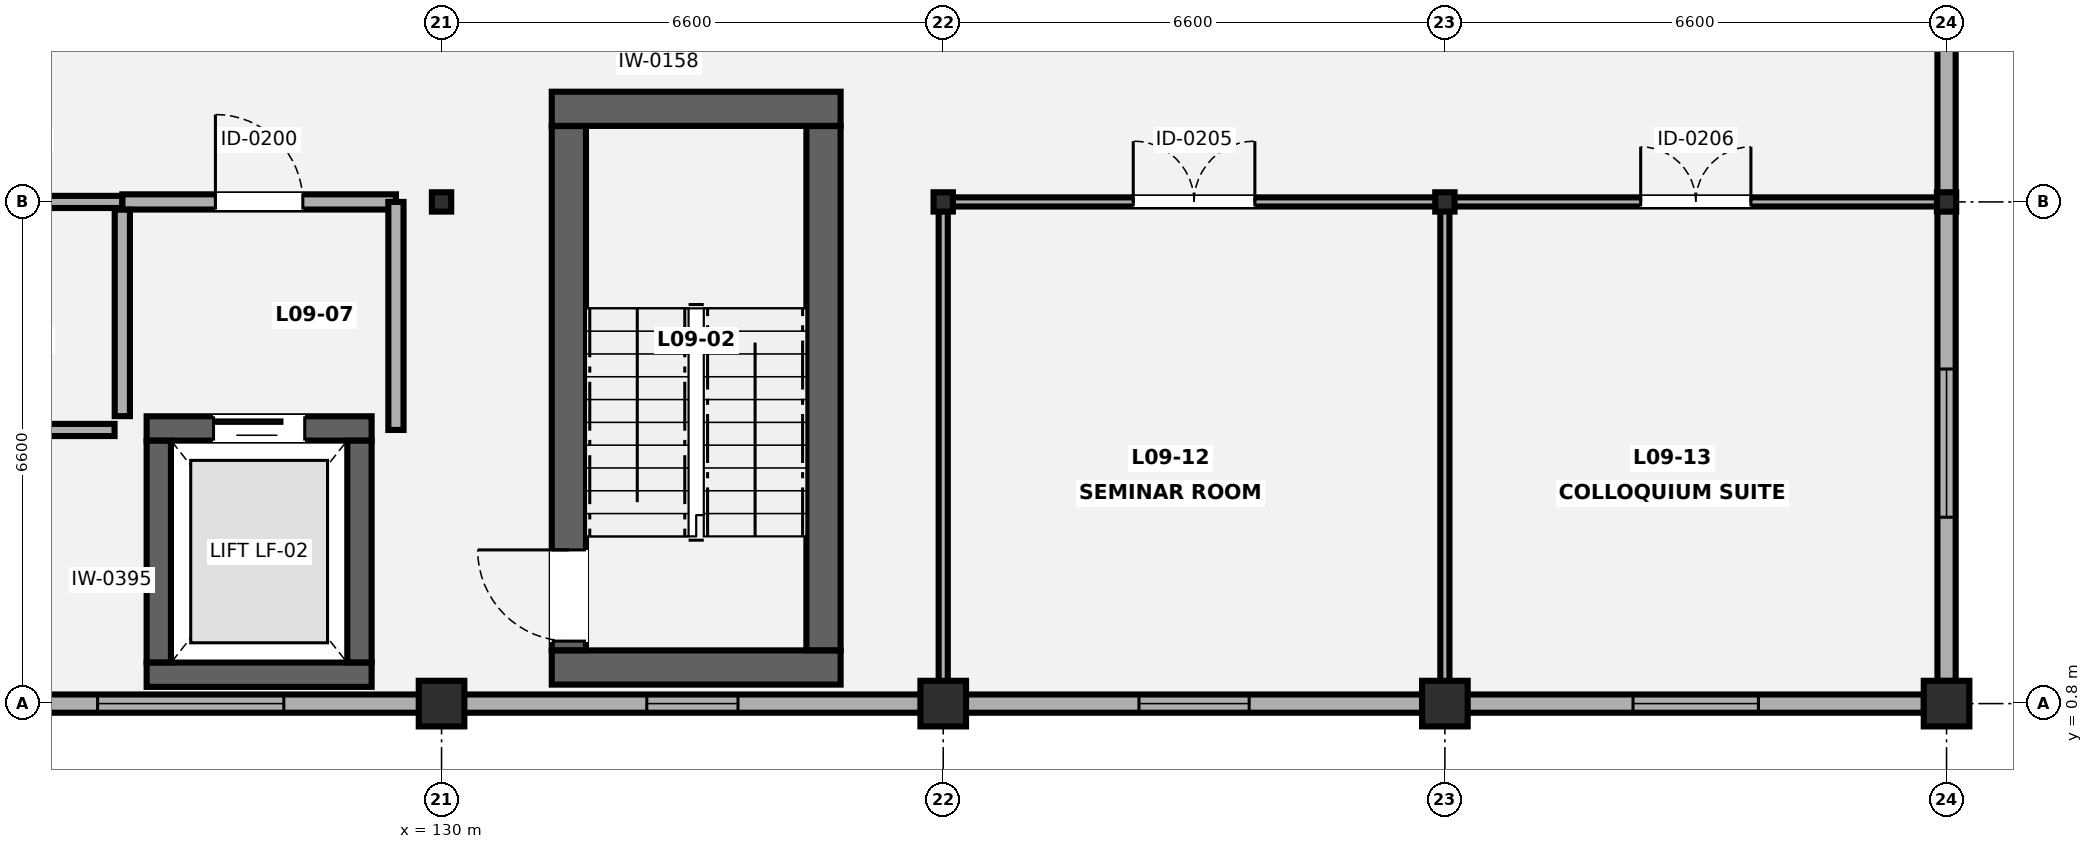
"""IFC4 building model, lengths in metres.
Left out: names, types, materials, properties, quantities, classifications, styles, units other than length and angle.
Written with IfcOpenShell. Run it as: python <this file> out.ifc"""

import sys

from ifc_helpers import new_model, si_unit, direction, frame, frame_2d, origin, origin_2d, place, context, subcontext, project, spatial, rectangle, circle, i_section, extrude, element, fill, save


model = new_model("IFC4")
c1 = context("Model", 3, precision=1e-05, world=origin(), true_north=direction((0.0, 1.0)))
c2 = subcontext(c1, "Body", "Model", "MODEL_VIEW")
j1 = project(units=[si_unit("LENGTHUNIT", "METRE"), si_unit("PLANEANGLEUNIT", "RADIAN")], contexts=[c1])
p1 = place(None, origin())
s1 = spatial("IfcSite", under=j1, at=p1, CompositionType="ELEMENT")
p2 = place(p1, origin())
s2 = spatial("IfcBuilding", under=s1, at=p2, CompositionType="ELEMENT")
p3 = place(p2, frame((0.0, 0.0, 38.15)))
s3 = spatial("IfcBuildingStorey", under=s2, at=p3, CompositionType="ELEMENT", Elevation=38.15)
p4 = place(p3, frame((130.0, 0.8, 0.0), z_axis=(0.0, 0.0, 1.0), x_axis=(1.0, 0.0, 0.0)))
e1 = element("IfcColumn", 1, at=p4, inside=s3, PredefinedType="PILASTER", context=c2, shape_type="SweptSolid", body=[
    extrude(circle(Radius=0.3, at=origin_2d()), origin(), (0.0, 0.0, 1.0), 3.85),
])
p5 = place(p3, frame((130.0, 7.4, 0.0), z_axis=(0.0, 0.0, 1.0), x_axis=(1.0, 0.0, 0.0)))
e2 = element("IfcColumn", 2, at=p5, inside=s3, PredefinedType="COLUMN", context=c2, shape_type="SweptSolid", body=[
    extrude(i_section(OverallWidth=0.254, OverallDepth=0.254, WebThickness=0.009, FlangeThickness=0.014, FilletRadius=0.014, at=origin_2d()), origin(), (0.0, 0.0, 1.0), 3.85),
])
p6 = place(p3, frame((136.6, 0.8, 0.0), z_axis=(0.0, 0.0, 1.0), x_axis=(1.0, 0.0, 0.0)))
e3 = element("IfcColumn", 3, at=p6, inside=s3, PredefinedType="PILASTER", context=c2, shape_type="SweptSolid", body=[
    extrude(circle(Radius=0.3, at=origin_2d()), origin(), (0.0, 0.0, 1.0), 3.85),
])
p7 = place(p3, frame((136.6, 7.4, 0.0), z_axis=(0.0, 0.0, 1.0), x_axis=(1.0, 0.0, 0.0)))
e4 = element("IfcColumn", 4, at=p7, inside=s3, PredefinedType="COLUMN", context=c2, shape_type="SweptSolid", body=[
    extrude(i_section(OverallWidth=0.254, OverallDepth=0.254, WebThickness=0.009, FlangeThickness=0.014, FilletRadius=0.014, at=origin_2d()), origin(), (0.0, 0.0, 1.0), 3.85),
])
p8 = place(p3, frame((143.2, 0.8, 0.0), z_axis=(0.0, 0.0, 1.0), x_axis=(1.0, 0.0, 0.0)))
e5 = element("IfcColumn", 5, at=p8, inside=s3, PredefinedType="PILASTER", context=c2, shape_type="SweptSolid", body=[
    extrude(circle(Radius=0.3, at=origin_2d()), origin(), (0.0, 0.0, 1.0), 3.57),
])
p9 = place(p3, frame((143.2, 7.4, 0.0), z_axis=(0.0, 0.0, 1.0), x_axis=(1.0, 0.0, 0.0)))
e6 = element("IfcColumn", 6, at=p9, inside=s3, PredefinedType="COLUMN", context=c2, shape_type="SweptSolid", body=[
    extrude(i_section(OverallWidth=0.254, OverallDepth=0.254, WebThickness=0.009, FlangeThickness=0.014, FilletRadius=0.014, at=origin_2d()), origin(), (0.0, 0.0, 1.0), 3.57),
])
p10 = place(p3, frame((149.8, 0.8, 0.0), z_axis=(0.0, 0.0, 1.0), x_axis=(1.0, 0.0, 0.0)))
e7 = element("IfcColumn", 7, at=p10, inside=s3, PredefinedType="PILASTER", context=c2, shape_type="SweptSolid", body=[
    extrude(circle(Radius=0.3, at=origin_2d()), origin(), (0.0, 0.0, 1.0), 3.57),
])
p11 = place(p3, frame((149.8, 7.4, 0.0), z_axis=(0.0, 0.0, 1.0), x_axis=(1.0, 0.0, 0.0)))
e8 = element("IfcColumn", 8, at=p11, inside=s3, PredefinedType="COLUMN", context=c2, shape_type="SweptSolid", body=[
    extrude(i_section(OverallWidth=0.254, OverallDepth=0.254, WebThickness=0.009, FlangeThickness=0.014, FilletRadius=0.014, at=origin_2d()), origin(), (0.0, 0.0, 1.0), 3.57),
])
p12 = place(p3, frame((149.8, 20.302, 0.0), z_axis=(0.0, 0.0, 1.0), x_axis=(0.0, -1.0, 0.0)))
e9 = element("IfcWall", 9, at=p12, inside=s3, PredefinedType="SOLIDWALL", context=c2, shape_type="SweptSolid", body=[
    extrude(rectangle(XDim=19.204, YDim=0.24, at=frame_2d((9.602, 0.0))), origin(), (0.0, 0.0, 1.0), 3.022),
])
p13 = place(p12, frame((2.4, 0.0, 0.85)))
e10 = element("IfcOpeningElement", 10, at=p13, cuts=e9, PredefinedType="OPENING", context=c2, shape_type="SweptSolid", body=[
    extrude(rectangle(XDim=1.55, YDim=1.4, at=frame_2d((0.775, 0.7))), frame((0.0, 0.13, 0.0), z_axis=(0.0, -1.0, 0.0), x_axis=(1.0, 0.0, 0.0)), (0.0, 0.0, 1.0), 0.26),
])
p14 = place(p12, frame((15.1, 0.0, 0.85)))
e11 = element("IfcOpeningElement", 11, at=p14, cuts=e9, PredefinedType="OPENING", context=c2, shape_type="SweptSolid", body=[
    extrude(rectangle(XDim=1.95, YDim=1.5, at=frame_2d((0.975, 0.75))), frame((0.0, 0.13, 0.0), z_axis=(0.0, -1.0, 0.0), x_axis=(1.0, 0.0, 0.0)), (0.0, 0.0, 1.0), 0.26),
])
p15 = place(p3, frame((149.502, 0.8, 0.0), z_axis=(0.0, 0.0, 1.0), x_axis=(-1.0, 0.0, 0.0)))
e12 = element("IfcWall", 12, at=p15, inside=s3, PredefinedType="SOLIDWALL", context=c2, shape_type="SweptSolid", body=[
    extrude(rectangle(XDim=45.604, YDim=0.24, at=frame_2d((22.802, 0.0))), origin(), (0.0, 0.0, 1.0), 3.155),
])
p16 = place(p15, frame((41.602, 0.0, 0.85)))
e13 = element("IfcOpeningElement", 13, at=p16, cuts=e12, PredefinedType="OPENING", context=c2, shape_type="SweptSolid", body=[
    extrude(rectangle(XDim=2.0, YDim=1.4, at=frame_2d((1.0, 0.7))), frame((0.0, 0.13, 0.0), z_axis=(0.0, -1.0, 0.0), x_axis=(1.0, 0.0, 0.0)), (0.0, 0.0, 1.0), 0.26),
])
p17 = place(p15, frame((34.927, 0.0, 0.85)))
e14 = element("IfcOpeningElement", 14, at=p17, cuts=e12, PredefinedType="OPENING", context=c2, shape_type="SweptSolid", body=[
    extrude(rectangle(XDim=2.15, YDim=1.4, at=frame_2d((1.075, 0.7))), frame((0.0, 0.13, 0.0), z_axis=(0.0, -1.0, 0.0), x_axis=(1.0, 0.0, 0.0)), (0.0, 0.0, 1.0), 0.26),
])
p18 = place(p15, frame((28.252, 0.0, 0.85)))
e15 = element("IfcOpeningElement", 15, at=p18, cuts=e12, PredefinedType="OPENING", context=c2, shape_type="SweptSolid", body=[
    extrude(rectangle(XDim=2.3, YDim=1.4, at=frame_2d((1.15, 0.7))), frame((0.0, 0.13, 0.0), z_axis=(0.0, -1.0, 0.0), x_axis=(1.0, 0.0, 0.0)), (0.0, 0.0, 1.0), 0.26),
])
p19 = place(p15, frame((21.577, 0.0, 0.85)))
e16 = element("IfcOpeningElement", 16, at=p19, cuts=e12, PredefinedType="OPENING", context=c2, shape_type="SweptSolid", body=[
    extrude(rectangle(XDim=2.45, YDim=1.4, at=frame_2d((1.225, 0.7))), frame((0.0, 0.13, 0.0), z_axis=(0.0, -1.0, 0.0), x_axis=(1.0, 0.0, 0.0)), (0.0, 0.0, 1.0), 0.26),
])
p20 = place(p15, frame((15.602, 0.0, 0.85)))
e17 = element("IfcOpeningElement", 17, at=p20, cuts=e12, PredefinedType="OPENING", context=c2, shape_type="SweptSolid", body=[
    extrude(rectangle(XDim=1.2, YDim=1.25, at=frame_2d((0.6, 0.625))), frame((0.0, 0.13, 0.0), z_axis=(0.0, -1.0, 0.0), x_axis=(1.0, 0.0, 0.0)), (0.0, 0.0, 1.0), 0.26),
])
p21 = place(p15, frame((8.877, 0.0, 0.85)))
e18 = element("IfcOpeningElement", 18, at=p21, cuts=e12, PredefinedType="OPENING", context=c2, shape_type="SweptSolid", body=[
    extrude(rectangle(XDim=1.45, YDim=1.25, at=frame_2d((0.725, 0.625))), frame((0.0, 0.13, 0.0), z_axis=(0.0, -1.0, 0.0), x_axis=(1.0, 0.0, 0.0)), (0.0, 0.0, 1.0), 0.26),
])
p22 = place(p15, frame((2.177, 0.0, 0.85)))
e19 = element("IfcOpeningElement", 19, at=p22, cuts=e12, PredefinedType="OPENING", context=c2, shape_type="SweptSolid", body=[
    extrude(rectangle(XDim=1.65, YDim=1.25, at=frame_2d((0.825, 0.625))), frame((0.0, 0.13, 0.0), z_axis=(0.0, -1.0, 0.0), x_axis=(1.0, 0.0, 0.0)), (0.0, 0.0, 1.0), 0.26),
])
for number, where, z_axis, x_axis in (
    (20, (131.45, 1.275, 0.0), (0.0, 0.0, 1.0), (1.0, 0.0, 0.0)),
    (21, (131.45, 8.625, 0.0), (0.0, 0.0, 1.0), (1.0, 0.0, 0.0)),
):
    element("IfcWall", number, at=place(p3, frame(where, z_axis=z_axis, x_axis=x_axis)), inside=s3, PredefinedType="SHEAR", context=c2, shape_type="SweptSolid", body=[
        extrude(rectangle(XDim=3.8, YDim=0.45, at=frame_2d((1.9, 0.0))), origin(), (0.0, 0.0, 1.0), 3.67),
    ])
p23 = place(p3, frame((131.675, 1.502, 0.0), z_axis=(0.0, 0.0, 1.0), x_axis=(0.0, 1.0, 0.0)))
e22 = element("IfcWall", 22, at=p23, inside=s3, PredefinedType="SHEAR", context=c2, shape_type="SweptSolid", body=[
    extrude(rectangle(XDim=6.896, YDim=0.45, at=frame_2d((3.448, 0.0))), origin(), (0.0, 0.0, 1.0), 3.67),
])
p24 = place(p23, frame((0.12, 0.0, 0.0)))
e23 = element("IfcOpeningElement", 23, at=p24, cuts=e22, PredefinedType="OPENING", context=c2, shape_type="SweptSolid", body=[
    extrude(rectangle(XDim=1.2, YDim=2.15, at=frame_2d((0.6, 1.075))), frame((0.0, 0.235, 0.0), z_axis=(0.0, -1.0, 0.0), x_axis=(1.0, 0.0, 0.0)), (0.0, 0.0, 1.0), 0.47),
])
p25 = place(p3, frame((135.025, 1.502, 0.0), z_axis=(0.0, 0.0, 1.0), x_axis=(0.0, 1.0, 0.0)))
e24 = element("IfcWall", 24, at=p25, inside=s3, PredefinedType="SHEAR", context=c2, shape_type="SweptSolid", body=[
    extrude(rectangle(XDim=6.896, YDim=0.45, at=frame_2d((3.448, 0.0))), origin(), (0.0, 0.0, 1.0), 3.67),
])
p26 = place(p3, frame((126.12, 1.18, 0.0), z_axis=(0.0, 0.0, 1.0), x_axis=(1.0, 0.0, 0.0)))
e25 = element("IfcWall", 25, at=p26, inside=s3, PredefinedType="SHEAR", context=c2, shape_type="SweptSolid", body=[
    extrude(rectangle(XDim=2.96, YDim=0.32, at=frame_2d((1.48, 0.0))), origin(), (0.0, 0.0, 1.0), 3.67),
])
p27 = place(p3, frame((126.12, 4.42, 0.0), z_axis=(0.0, 0.0, 1.0), x_axis=(1.0, 0.0, 0.0)))
e26 = element("IfcWall", 26, at=p27, inside=s3, PredefinedType="SHEAR", context=c2, shape_type="SweptSolid", body=[
    extrude(rectangle(XDim=2.96, YDim=0.32, at=frame_2d((1.48, 0.0))), origin(), (0.0, 0.0, 1.0), 3.67),
])
p28 = place(p27, frame((0.88, 0.0, 0.0)))
e27 = element("IfcOpeningElement", 27, at=p28, cuts=e26, PredefinedType="OPENING", context=c2, shape_type="SweptSolid", body=[
    extrude(rectangle(XDim=1.2, YDim=2.2, at=frame_2d((0.6, 1.1))), frame((0.0, 0.17, 0.0), z_axis=(0.0, -1.0, 0.0), x_axis=(1.0, 0.0, 0.0)), (0.0, 0.0, 1.0), 0.34),
])
for number, where, z_axis, x_axis in (
    (28, (126.28, 1.342, 0.0), (0.0, 0.0, 1.0), (0.0, 1.0, 0.0)),
    (29, (128.92, 1.342, 0.0), (0.0, 0.0, 1.0), (0.0, 1.0, 0.0)),
):
    element("IfcWall", number, at=place(p3, frame(where, z_axis=z_axis, x_axis=x_axis)), inside=s3, PredefinedType="SHEAR", context=c2, shape_type="SweptSolid", body=[
        extrude(rectangle(XDim=2.916, YDim=0.32, at=frame_2d((1.458, 0.0))), origin(), (0.0, 0.0, 1.0), 3.67),
    ])
p29 = place(p3, frame((125.8, 7.4, 0.0), z_axis=(0.0, 0.0, 1.0), x_axis=(1.0, 0.0, 0.0)))
e30 = element("IfcWall", 30, at=p29, inside=s3, PredefinedType="SOLIDWALL", context=c2, shape_type="SweptSolid", body=[
    extrude(rectangle(XDim=3.6, YDim=0.2, at=frame_2d((1.8, 0.0))), origin(), (0.0, 0.0, 1.0), 2.943),
])
p30 = place(p29, frame((1.225, 0.0, 0.0)))
e31 = element("IfcOpeningElement", 31, at=p30, cuts=e30, PredefinedType="OPENING", context=c2, shape_type="SweptSolid", body=[
    extrude(rectangle(XDim=1.15, YDim=2.15, at=frame_2d((0.575, 1.075))), frame((0.0, 0.11, 0.0), z_axis=(0.0, -1.0, 0.0), x_axis=(1.0, 0.0, 0.0)), (0.0, 0.0, 1.0), 0.22),
])
p31 = place(p3, frame((125.8, 4.582, 0.0), z_axis=(0.0, 0.0, 1.0), x_axis=(0.0, 1.0, 0.0)))
e32 = element("IfcWall", 32, at=p31, inside=s3, PredefinedType="SOLIDWALL", context=c2, shape_type="SweptSolid", body=[
    extrude(rectangle(XDim=2.716, YDim=0.2, at=frame_2d((1.358, 0.0))), origin(), (0.0, 0.0, 1.0), 3.67),
])
p32 = place(p3, frame((129.4, 4.4, 0.0), z_axis=(0.0, 0.0, 1.0), x_axis=(0.0, 1.0, 0.0)))
e33 = element("IfcWall", 33, at=p32, inside=s3, PredefinedType="SOLIDWALL", context=c2, shape_type="SweptSolid", body=[
    extrude(rectangle(XDim=3.0, YDim=0.2, at=frame_2d((1.5, 0.0))), origin(), (0.0, 0.0, 1.0), 3.67),
])
p33 = place(p3, frame((122.9, 4.4, 0.0), z_axis=(0.0, 0.0, 1.0), x_axis=(1.0, 0.0, 0.0)))
e34 = element("IfcWall", 34, at=p33, inside=s3, PredefinedType="PARTITIONING", context=c2, shape_type="SweptSolid", body=[
    extrude(rectangle(XDim=2.798, YDim=0.16, at=frame_2d((1.399, 0.0))), origin(), (0.0, 0.0, 1.0), 3.196),
])
p34 = place(p3, frame((122.9, 7.4, 0.0), z_axis=(0.0, 0.0, 1.0), x_axis=(1.0, 0.0, 0.0)))
e35 = element("IfcWall", 35, at=p34, inside=s3, PredefinedType="PARTITIONING", context=c2, shape_type="SweptSolid", body=[
    extrude(rectangle(XDim=2.898, YDim=0.16, at=frame_2d((1.449, 0.0))), origin(), (0.0, 0.0, 1.0), 2.943),
])
p35 = place(p34, frame((0.989, 0.0, 0.0)))
e36 = element("IfcOpeningElement", 36, at=p35, cuts=e35, PredefinedType="OPENING", context=c2, shape_type="SweptSolid", body=[
    extrude(rectangle(XDim=0.92, YDim=2.12, at=frame_2d((0.46, 1.06))), frame((0.0, 0.09, 0.0), z_axis=(0.0, -1.0, 0.0), x_axis=(1.0, 0.0, 0.0)), (0.0, 0.0, 1.0), 0.18),
])
p36 = place(p3, frame((136.6, 7.4, 0.0), z_axis=(0.0, 0.0, 1.0), x_axis=(1.0, 0.0, 0.0)))
e37 = element("IfcWall", 37, at=p36, inside=s3, PredefinedType="PARTITIONING", context=c2, shape_type="SweptSolid", body=[
    extrude(rectangle(XDim=6.6, YDim=0.12, at=frame_2d((3.3, 0.0))), origin(), (0.0, 0.0, 1.0), 2.943),
])
p37 = place(p36, frame((2.5, 0.0, 0.0)))
e38 = element("IfcOpeningElement", 38, at=p37, cuts=e37, PredefinedType="OPENING", context=c2, shape_type="SweptSolid", body=[
    extrude(rectangle(XDim=1.6, YDim=2.18, at=frame_2d((0.8, 1.09))), frame((0.0, 0.07, 0.0), z_axis=(0.0, -1.0, 0.0), x_axis=(1.0, 0.0, 0.0)), (0.0, 0.0, 1.0), 0.14),
])
p38 = place(p3, frame((136.6, 0.8, 0.0), z_axis=(0.0, 0.0, 1.0), x_axis=(0.0, 1.0, 0.0)))
e39 = element("IfcWall", 39, at=p38, inside=s3, PredefinedType="PARTITIONING", context=c2, shape_type="SweptSolid", body=[
    extrude(rectangle(XDim=6.538, YDim=0.12, at=frame_2d((3.269, 0.0))), origin(), (0.0, 0.0, 1.0), 3.022),
])
p39 = place(p3, frame((143.2, 0.8, 0.0), z_axis=(0.0, 0.0, 1.0), x_axis=(0.0, 1.0, 0.0)))
e40 = element("IfcWall", 40, at=p39, inside=s3, PredefinedType="PARTITIONING", context=c2, shape_type="SweptSolid", body=[
    extrude(rectangle(XDim=6.6, YDim=0.12, at=frame_2d((3.3, 0.0))), origin(), (0.0, 0.0, 1.0), 3.022),
])
p40 = place(p3, frame((143.202, 7.4, 0.0), z_axis=(0.0, 0.0, 1.0), x_axis=(1.0, 0.0, 0.0)))
e41 = element("IfcWall", 41, at=p40, inside=s3, PredefinedType="PARTITIONING", context=c2, shape_type="SweptSolid", body=[
    extrude(rectangle(XDim=6.598, YDim=0.12, at=frame_2d((3.299, 0.0))), origin(), (0.0, 0.0, 1.0), 2.943),
])
p41 = place(p40, frame((2.574, 0.0, 0.0)))
e42 = element("IfcOpeningElement", 42, at=p41, cuts=e41, PredefinedType="OPENING", context=c2, shape_type="SweptSolid", body=[
    extrude(rectangle(XDim=1.45, YDim=2.12, at=frame_2d((0.725, 1.06))), frame((0.0, 0.07, 0.0), z_axis=(0.0, -1.0, 0.0), x_axis=(1.0, 0.0, 0.0)), (0.0, 0.0, 1.0), 0.14),
])
p42 = place(p14, origin())
e43 = element("IfcWindow", 43, at=p42, inside=s3, PartitioningType="SINGLE_PANEL", PredefinedType="WINDOW", context=c2, shape_type="SweptSolid", body=[
    extrude(rectangle(XDim=1.95, YDim=1.5, at=frame_2d((0.975, 0.75))), frame((0.0, 0.03, 0.0), z_axis=(0.0, -1.0, 0.0), x_axis=(1.0, 0.0, 0.0)), (0.0, 0.0, 1.0), 0.06),
])
fill(e11, e43)
p43 = place(p19, origin())
e44 = element("IfcWindow", 44, at=p43, inside=s3, PartitioningType="SINGLE_PANEL", PredefinedType="WINDOW", context=c2, shape_type="SweptSolid", body=[
    extrude(rectangle(XDim=2.45, YDim=1.4, at=frame_2d((1.225, 0.7))), frame((0.0, 0.03, 0.0), z_axis=(0.0, -1.0, 0.0), x_axis=(1.0, 0.0, 0.0)), (0.0, 0.0, 1.0), 0.06),
])
fill(e16, e44)
p44 = place(p20, origin())
e45 = element("IfcWindow", 45, at=p44, inside=s3, PartitioningType="SINGLE_PANEL", PredefinedType="WINDOW", context=c2, shape_type="SweptSolid", body=[
    extrude(rectangle(XDim=1.2, YDim=1.25, at=frame_2d((0.6, 0.625))), frame((0.0, 0.03, 0.0), z_axis=(0.0, -1.0, 0.0), x_axis=(1.0, 0.0, 0.0)), (0.0, 0.0, 1.0), 0.06),
])
fill(e17, e45)
p45 = place(p21, origin())
e46 = element("IfcWindow", 46, at=p45, inside=s3, PartitioningType="SINGLE_PANEL", PredefinedType="WINDOW", context=c2, shape_type="SweptSolid", body=[
    extrude(rectangle(XDim=1.45, YDim=1.25, at=frame_2d((0.725, 0.625))), frame((0.0, 0.03, 0.0), z_axis=(0.0, -1.0, 0.0), x_axis=(1.0, 0.0, 0.0)), (0.0, 0.0, 1.0), 0.06),
])
fill(e18, e46)
p46 = place(p22, origin())
e47 = element("IfcWindow", 47, at=p46, inside=s3, PartitioningType="SINGLE_PANEL", PredefinedType="WINDOW", context=c2, shape_type="SweptSolid", body=[
    extrude(rectangle(XDim=1.65, YDim=1.25, at=frame_2d((0.825, 0.625))), frame((0.0, 0.03, 0.0), z_axis=(0.0, -1.0, 0.0), x_axis=(1.0, 0.0, 0.0)), (0.0, 0.0, 1.0), 0.06),
])
fill(e19, e47)
p47 = place(p24, origin())
e48 = element("IfcDoor", 48, at=p47, inside=s3, OperationType="SINGLE_SWING_RIGHT", PredefinedType="DOOR", context=c2, shape_type="SweptSolid", body=[
    extrude(rectangle(XDim=1.2, YDim=2.15, at=frame_2d((0.6, 1.075))), frame((0.0, 0.025, 0.0), z_axis=(0.0, -1.0, 0.0), x_axis=(1.0, 0.0, 0.0)), (0.0, 0.0, 1.0), 0.05),
])
fill(e23, e48)
p48 = place(p28, origin())
e49 = element("IfcDoor", 49, at=p48, inside=s3, OperationType="SLIDING_TO_LEFT", PredefinedType="DOOR", context=c2, shape_type="SweptSolid", body=[
    extrude(rectangle(XDim=1.2, YDim=2.2, at=frame_2d((0.6, 1.1))), frame((0.0, 0.025, 0.0), z_axis=(0.0, -1.0, 0.0), x_axis=(1.0, 0.0, 0.0)), (0.0, 0.0, 1.0), 0.05),
])
fill(e27, e49)
p49 = place(p30, origin())
e50 = element("IfcDoor", 50, at=p49, inside=s3, OperationType="SINGLE_SWING_LEFT", PredefinedType="DOOR", context=c2, shape_type="SweptSolid", body=[
    extrude(rectangle(XDim=1.15, YDim=2.15, at=frame_2d((0.575, 1.075))), frame((0.0, 0.025, 0.0), z_axis=(0.0, -1.0, 0.0), x_axis=(1.0, 0.0, 0.0)), (0.0, 0.0, 1.0), 0.05),
])
fill(e31, e50)
p50 = place(p37, origin())
e51 = element("IfcDoor", 51, at=p50, inside=s3, OperationType="DOUBLE_DOOR_SINGLE_SWING", PredefinedType="DOOR", context=c2, shape_type="SweptSolid", body=[
    extrude(rectangle(XDim=1.6, YDim=2.18, at=frame_2d((0.8, 1.09))), frame((0.0, 0.025, 0.0), z_axis=(0.0, -1.0, 0.0), x_axis=(1.0, 0.0, 0.0)), (0.0, 0.0, 1.0), 0.05),
])
fill(e38, e51)
p51 = place(p41, origin())
e52 = element("IfcDoor", 52, at=p51, inside=s3, OperationType="DOUBLE_DOOR_SINGLE_SWING", PredefinedType="DOOR", context=c2, shape_type="SweptSolid", body=[
    extrude(rectangle(XDim=1.45, YDim=2.12, at=frame_2d((0.725, 1.06))), frame((0.0, 0.025, 0.0), z_axis=(0.0, -1.0, 0.0), x_axis=(1.0, 0.0, 0.0)), (0.0, 0.0, 1.0), 0.05),
])
fill(e42, e52)
save(model, sys.argv[1])
